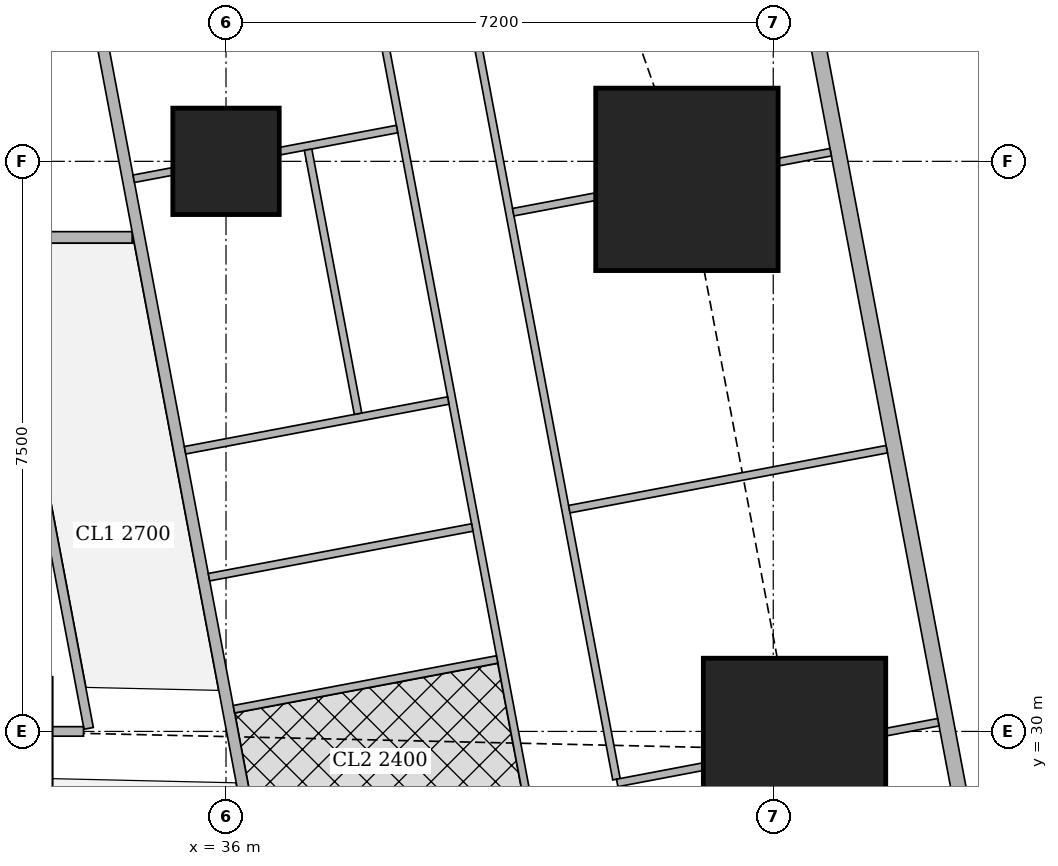
"""IFC4 building model, lengths in metres.
Left out: names, types, materials, properties, quantities, classifications, styles, units other than length and angle.
Written with IfcOpenShell. Run it as: python <this file> out.ifc"""

import sys

from ifc_helpers import new_model, si_unit, direction, frame, frame_2d, origin, origin_2d, place, context, subcontext, project, spatial, rectangle, extrude, element, fill, save


model = new_model("IFC4")
c1 = context("Model", 3, precision=1e-05, world=origin(), true_north=direction((0.0, 1.0)))
c2 = subcontext(c1, "Body", "Model", "MODEL_VIEW")
j1 = project(units=[si_unit("LENGTHUNIT", "METRE"), si_unit("PLANEANGLEUNIT", "RADIAN")], contexts=[c1])
p1 = place(None, origin())
s1 = spatial("IfcSite", under=j1, at=p1, CompositionType="ELEMENT")
p2 = place(p1, origin())
s2 = spatial("IfcBuilding", under=s1, at=p2, CompositionType="ELEMENT")
p3 = place(p2, frame((0.0, 0.0, 223.7)))
s3 = spatial("IfcBuildingStorey", under=s2, at=p3, CompositionType="ELEMENT", Elevation=223.7)
p4 = place(p3, frame((43.48, 29.763, 0.0), z_axis=(0.0, 0.0, 1.0), x_axis=(1.0, 0.0, 0.0)))
e1 = element("IfcColumn", 1, at=p4, inside=s3, PredefinedType="COLUMN", context=c2, shape_type="SweptSolid", body=[
    extrude(rectangle(XDim=2.4, YDim=2.4, at=origin_2d()), origin(), (0.0, 0.0, 1.0), 3.75),
])
p5 = place(p3, frame((36.0, 37.5, 0.0), z_axis=(0.0, 0.0, 1.0), x_axis=(1.0, 0.0, 0.0)))
e2 = element("IfcColumn", 2, at=p5, inside=s3, PredefinedType="COLUMN", context=c2, shape_type="SweptSolid", body=[
    extrude(rectangle(XDim=1.4, YDim=1.4, at=origin_2d()), origin(), (0.0, 0.0, 1.0), 3.75),
])
p6 = place(p3, frame((42.064, 37.263, 0.0), z_axis=(0.0, 0.0, 1.0), x_axis=(1.0, 0.0, 0.0)))
e3 = element("IfcColumn", 3, at=p6, inside=s3, PredefinedType="COLUMN", context=c2, shape_type="SweptSolid", body=[
    extrude(rectangle(XDim=2.4, YDim=2.4, at=origin_2d()), origin(), (0.0, 0.0, 1.0), 3.75),
])
p7 = place(p3, frame((50.653, 2.703, 0.0), z_axis=(0.0, 0.0, 1.0), x_axis=(-0.185612026696, 0.982623109613, 0.0)))
e4 = element("IfcWall", 4, at=p7, inside=s3, PredefinedType="SOLIDWALL", context=c2, shape_type="SweptSolid", body=[
    extrude(rectangle(XDim=41.393, YDim=0.2, at=frame_2d((20.697, 0.0))), origin(), (0.0, 0.0, 1.0), 3.5),
])
p8 = place(p7, frame((1.633, 0.0, 0.9)))
e5 = element("IfcOpeningElement", 5, at=p8, cuts=e4, PredefinedType="OPENING", context=c2, shape_type="SweptSolid", body=[
    extrude(rectangle(XDim=1.8, YDim=1.5, at=frame_2d((0.9, 0.75))), frame((0.0, 0.11, 0.0), z_axis=(0.0, -1.0, 0.0), x_axis=(1.0, 0.0, 0.0)), (0.0, 0.0, 1.0), 0.22),
])
p9 = place(p7, frame((6.032, 0.0, 0.9)))
e6 = element("IfcOpeningElement", 6, at=p9, cuts=e4, PredefinedType="OPENING", context=c2, shape_type="SweptSolid", body=[
    extrude(rectangle(XDim=1.8, YDim=1.5, at=frame_2d((0.9, 0.75))), frame((0.0, 0.11, 0.0), z_axis=(0.0, -1.0, 0.0), x_axis=(1.0, 0.0, 0.0)), (0.0, 0.0, 1.0), 0.22),
])
p10 = place(p7, frame((9.848, 0.0, 0.9)))
e7 = element("IfcOpeningElement", 7, at=p10, cuts=e4, PredefinedType="OPENING", context=c2, shape_type="SweptSolid", body=[
    extrude(rectangle(XDim=1.8, YDim=1.5, at=frame_2d((0.9, 0.75))), frame((0.0, 0.11, 0.0), z_axis=(0.0, -1.0, 0.0), x_axis=(1.0, 0.0, 0.0)), (0.0, 0.0, 1.0), 0.22),
])
p11 = place(p7, frame((13.664, 0.0, 0.9)))
e8 = element("IfcOpeningElement", 8, at=p11, cuts=e4, PredefinedType="OPENING", context=c2, shape_type="SweptSolid", body=[
    extrude(rectangle(XDim=1.8, YDim=1.5, at=frame_2d((0.9, 0.75))), frame((0.0, 0.11, 0.0), z_axis=(0.0, -1.0, 0.0), x_axis=(1.0, 0.0, 0.0)), (0.0, 0.0, 1.0), 0.22),
])
p12 = place(p7, frame((17.481, 0.0, 0.9)))
e9 = element("IfcOpeningElement", 9, at=p12, cuts=e4, PredefinedType="OPENING", context=c2, shape_type="SweptSolid", body=[
    extrude(rectangle(XDim=1.8, YDim=1.5, at=frame_2d((0.9, 0.75))), frame((0.0, 0.11, 0.0), z_axis=(0.0, -1.0, 0.0), x_axis=(1.0, 0.0, 0.0)), (0.0, 0.0, 1.0), 0.22),
])
p13 = place(p7, frame((21.297, 0.0, 0.9)))
e10 = element("IfcOpeningElement", 10, at=p13, cuts=e4, PredefinedType="OPENING", context=c2, shape_type="SweptSolid", body=[
    extrude(rectangle(XDim=1.8, YDim=1.5, at=frame_2d((0.9, 0.75))), frame((0.0, 0.11, 0.0), z_axis=(0.0, -1.0, 0.0), x_axis=(1.0, 0.0, 0.0)), (0.0, 0.0, 1.0), 0.22),
])
p14 = place(p7, frame((25.113, 0.0, 0.9)))
e11 = element("IfcOpeningElement", 11, at=p14, cuts=e4, PredefinedType="OPENING", context=c2, shape_type="SweptSolid", body=[
    extrude(rectangle(XDim=1.8, YDim=1.5, at=frame_2d((0.9, 0.75))), frame((0.0, 0.11, 0.0), z_axis=(0.0, -1.0, 0.0), x_axis=(1.0, 0.0, 0.0)), (0.0, 0.0, 1.0), 0.22),
])
p15 = place(p7, frame((28.93, 0.0, 0.9)))
e12 = element("IfcOpeningElement", 12, at=p15, cuts=e4, PredefinedType="OPENING", context=c2, shape_type="SweptSolid", body=[
    extrude(rectangle(XDim=1.8, YDim=1.5, at=frame_2d((0.9, 0.75))), frame((0.0, 0.11, 0.0), z_axis=(0.0, -1.0, 0.0), x_axis=(1.0, 0.0, 0.0)), (0.0, 0.0, 1.0), 0.22),
])
p16 = place(p7, frame((32.746, 0.0, 0.9)))
e13 = element("IfcOpeningElement", 13, at=p16, cuts=e4, PredefinedType="OPENING", context=c2, shape_type="SweptSolid", body=[
    extrude(rectangle(XDim=1.8, YDim=1.5, at=frame_2d((0.9, 0.75))), frame((0.0, 0.11, 0.0), z_axis=(0.0, -1.0, 0.0), x_axis=(1.0, 0.0, 0.0)), (0.0, 0.0, 1.0), 0.22),
])
p17 = place(p7, frame((36.481, 0.0, 0.9)))
e14 = element("IfcOpeningElement", 14, at=p17, cuts=e4, PredefinedType="OPENING", context=c2, shape_type="SweptSolid", body=[
    extrude(rectangle(XDim=1.8, YDim=1.5, at=frame_2d((0.9, 0.75))), frame((0.0, 0.11, 0.0), z_axis=(0.0, -1.0, 0.0), x_axis=(1.0, 0.0, 0.0)), (0.0, 0.0, 1.0), 0.22),
])
p18 = place(p3, frame((16.201, 36.5, 0.0), z_axis=(0.0, 0.0, 1.0), x_axis=(1.0, 0.0, 0.0)))
e15 = element("IfcWall", 15, at=p18, inside=s3, PredefinedType="SOLIDWALL", context=c2, shape_type="SweptSolid", body=[
    extrude(rectangle(XDim=18.564, YDim=0.15, at=frame_2d((9.282, 0.0))), origin(), (0.0, 0.0, 1.0), 3.5),
])
p19 = place(p18, frame((0.874, 0.0, 0.0)))
e16 = element("IfcOpeningElement", 16, at=p19, cuts=e15, PredefinedType="OPENING", context=c2, shape_type="SweptSolid", body=[
    extrude(rectangle(XDim=1.0, YDim=2.1, at=frame_2d((0.5, 1.05))), frame((0.0, 0.085, 0.0), z_axis=(0.0, -1.0, 0.0), x_axis=(1.0, 0.0, 0.0)), (0.0, 0.0, 1.0), 0.17),
])
p20 = place(p18, frame((10.156, 0.0, 0.0)))
e17 = element("IfcOpeningElement", 17, at=p20, cuts=e15, PredefinedType="OPENING", context=c2, shape_type="SweptSolid", body=[
    extrude(rectangle(XDim=1.0, YDim=2.1, at=frame_2d((0.5, 1.05))), frame((0.0, 0.085, 0.0), z_axis=(0.0, -1.0, 0.0), x_axis=(1.0, 0.0, 0.0)), (0.0, 0.0, 1.0), 0.17),
])
p21 = place(p3, frame((33.68, 42.723, 0.0), z_axis=(0.0, 0.0, 1.0), x_axis=(0.185601160014, -0.982625162207, 0.0)))
e18 = element("IfcWall", 18, at=p21, inside=s3, PredefinedType="SOLIDWALL", context=c2, shape_type="SweptSolid", body=[
    extrude(rectangle(XDim=41.051, YDim=0.15, at=frame_2d((20.526, 0.0))), origin(), (0.0, 0.0, 1.0), 2.5),
])
p22 = place(p21, frame((16.123, 0.0, 0.0)))
e19 = element("IfcOpeningElement", 19, at=p22, cuts=e18, PredefinedType="OPENING", context=c2, shape_type="SweptSolid", body=[
    extrude(rectangle(XDim=1.0, YDim=2.1, at=frame_2d((0.5, 1.05))), frame((0.0, 0.085, 0.0), z_axis=(0.0, -1.0, 0.0), x_axis=(1.0, 0.0, 0.0)), (0.0, 0.0, 1.0), 0.17),
])
p23 = place(p21, frame((19.938, 0.0, 0.0)))
e20 = element("IfcOpeningElement", 20, at=p23, cuts=e18, PredefinedType="OPENING", context=c2, shape_type="SweptSolid", body=[
    extrude(rectangle(XDim=1.0, YDim=2.1, at=frame_2d((0.5, 1.05))), frame((0.0, 0.085, 0.0), z_axis=(0.0, -1.0, 0.0), x_axis=(1.0, 0.0, 0.0)), (0.0, 0.0, 1.0), 0.17),
])
p24 = place(p21, frame((30.902, 0.0, 0.0)))
e21 = element("IfcOpeningElement", 21, at=p24, cuts=e18, PredefinedType="OPENING", context=c2, shape_type="SweptSolid", body=[
    extrude(rectangle(XDim=1.0, YDim=2.1, at=frame_2d((0.5, 1.05))), frame((0.0, 0.085, 0.0), z_axis=(0.0, -1.0, 0.0), x_axis=(1.0, 0.0, 0.0)), (0.0, 0.0, 1.0), 0.17),
])
p25 = place(p3, frame((38.764, 41.941, 0.0), z_axis=(0.0, 0.0, 1.0), x_axis=(0.185512176227, -0.982641965556, 0.0)))
e22 = element("IfcWall", 22, at=p25, inside=s3, PredefinedType="PARTITIONING", context=c2, shape_type="SweptSolid", body=[
    extrude(rectangle(XDim=12.792, YDim=0.1, at=frame_2d((6.396, 0.0))), origin(), (0.0, 0.0, 1.0), 2.5),
])
p26 = place(p25, frame((11.35, 0.0, 0.0)))
e23 = element("IfcOpeningElement", 23, at=p26, cuts=e22, PredefinedType="OPENING", context=c2, shape_type="SweptSolid", body=[
    extrude(rectangle(XDim=0.9, YDim=2.1, at=frame_2d((0.45, 1.05))), frame((0.0, 0.06, 0.0), z_axis=(0.0, -1.0, 0.0), x_axis=(1.0, 0.0, 0.0)), (0.0, 0.0, 1.0), 0.12),
])
p27 = place(p25, frame((8.085, 0.0, 0.0)))
e24 = element("IfcOpeningElement", 24, at=p27, cuts=e22, PredefinedType="OPENING", context=c2, shape_type="SweptSolid", body=[
    extrude(rectangle(XDim=0.9, YDim=2.1, at=frame_2d((0.45, 1.05))), frame((0.0, 0.06, 0.0), z_axis=(0.0, -1.0, 0.0), x_axis=(1.0, 0.0, 0.0)), (0.0, 0.0, 1.0), 0.12),
])
p28 = place(p25, frame((3.7, 0.0, 0.0)))
e25 = element("IfcOpeningElement", 25, at=p28, cuts=e22, PredefinedType="OPENING", context=c2, shape_type="SweptSolid", body=[
    extrude(rectangle(XDim=0.9, YDim=2.1, at=frame_2d((0.45, 1.05))), frame((0.0, 0.06, 0.0), z_axis=(0.0, -1.0, 0.0), x_axis=(1.0, 0.0, 0.0)), (0.0, 0.0, 1.0), 0.12),
])
p29 = place(p3, frame((37.473, 42.309, 0.0), z_axis=(0.0, 0.0, 1.0), x_axis=(0.185570636839, -0.982630927024, 0.0)))
e26 = element("IfcWall", 26, at=p29, inside=s3, PredefinedType="PARTITIONING", context=c2, shape_type="SweptSolid", body=[
    extrude(rectangle(XDim=13.553, YDim=0.1, at=frame_2d((6.777, 0.0))), origin(), (0.0, 0.0, 1.0), 2.5),
])
p30 = place(p29, frame((12.128, 0.0, 0.0)))
e27 = element("IfcOpeningElement", 27, at=p30, cuts=e26, PredefinedType="OPENING", context=c2, shape_type="SweptSolid", body=[
    extrude(rectangle(XDim=0.9, YDim=2.1, at=frame_2d((0.45, 1.05))), frame((0.0, 0.06, 0.0), z_axis=(0.0, -1.0, 0.0), x_axis=(1.0, 0.0, 0.0)), (0.0, 0.0, 1.0), 0.12),
])
p31 = place(p29, frame((8.487, 0.0, 0.0)))
e28 = element("IfcOpeningElement", 28, at=p31, cuts=e26, PredefinedType="OPENING", context=c2, shape_type="SweptSolid", body=[
    extrude(rectangle(XDim=0.9, YDim=2.1, at=frame_2d((0.45, 1.05))), frame((0.0, 0.06, 0.0), z_axis=(0.0, -1.0, 0.0), x_axis=(1.0, 0.0, 0.0)), (0.0, 0.0, 1.0), 0.12),
])
p32 = place(p29, frame((2.853, 0.0, 0.0)))
e29 = element("IfcOpeningElement", 29, at=p32, cuts=e26, PredefinedType="OPENING", context=c2, shape_type="SweptSolid", body=[
    extrude(rectangle(XDim=0.9, YDim=2.1, at=frame_2d((0.45, 1.05))), frame((0.0, 0.06, 0.0), z_axis=(0.0, -1.0, 0.0), x_axis=(1.0, 0.0, 0.0)), (0.0, 0.0, 1.0), 0.12),
])
p33 = place(p29, frame((10.22, 0.0, 0.0)))
e30 = element("IfcOpeningElement", 30, at=p33, cuts=e26, PredefinedType="OPENING", context=c2, shape_type="SweptSolid", body=[
    extrude(rectangle(XDim=0.9, YDim=2.1, at=frame_2d((0.45, 1.05))), frame((0.0, 0.06, 0.0), z_axis=(0.0, -1.0, 0.0), x_axis=(1.0, 0.0, 0.0)), (0.0, 0.0, 1.0), 0.12),
])
p34 = place(p29, frame((5.819, 0.0, 0.0)))
e31 = element("IfcOpeningElement", 31, at=p34, cuts=e26, PredefinedType="OPENING", context=c2, shape_type="SweptSolid", body=[
    extrude(rectangle(XDim=0.9, YDim=2.1, at=frame_2d((0.45, 1.05))), frame((0.0, 0.06, 0.0), z_axis=(0.0, -1.0, 0.0), x_axis=(1.0, 0.0, 0.0)), (0.0, 0.0, 1.0), 0.12),
])
p35 = place(p3, frame((43.955, 37.62, 0.0), z_axis=(0.0, 0.0, 1.0), x_axis=(-0.982495415327, -0.186286765128, 0.0)))
e32 = element("IfcWall", 32, at=p35, inside=s3, PredefinedType="PARTITIONING", context=c2, shape_type="SweptSolid", body=[
    extrude(rectangle(XDim=0.693, YDim=0.1, at=frame_2d((0.347, 0.0))), origin(), (0.0, 0.0, 1.0), 3.5),
])
p36 = place(p3, frame((40.854, 37.034, 0.0), z_axis=(0.0, 0.0, 1.0), x_axis=(-0.982651678759, -0.185460718839, 0.0)))
e33 = element("IfcWall", 33, at=p36, inside=s3, PredefinedType="PARTITIONING", context=c2, shape_type="SweptSolid", body=[
    extrude(rectangle(XDim=1.094, YDim=0.1, at=frame_2d((0.547, 0.0))), origin(), (0.0, 0.0, 1.0), 3.5),
])
p37 = place(p3, frame((44.693, 33.713, 0.0), z_axis=(0.0, 0.0, 1.0), x_axis=(-0.982623519589, -0.185609856287, 0.0)))
e34 = element("IfcWall", 34, at=p37, inside=s3, PredefinedType="PARTITIONING", context=c2, shape_type="SweptSolid", body=[
    extrude(rectangle(XDim=4.25, YDim=0.1, at=frame_2d((2.125, 0.0))), origin(), (0.0, 0.0, 1.0), 2.05),
])
p38 = place(p3, frame((45.372, 30.121, 0.0), z_axis=(0.0, 0.0, 1.0), x_axis=(-0.98254419619, -0.186029305578, 0.0)))
e35 = element("IfcWall", 35, at=p38, inside=s3, PredefinedType="PARTITIONING", context=c2, shape_type="SweptSolid", body=[
    extrude(rectangle(XDim=0.694, YDim=0.1, at=frame_2d((0.347, 0.0))), origin(), (0.0, 0.0, 1.0), 3.5),
])
p39 = place(p3, frame((42.27, 29.535, 0.0), z_axis=(0.0, 0.0, 1.0), x_axis=(-0.982502700549, -0.186248338017, 0.0)))
e36 = element("IfcWall", 36, at=p39, inside=s3, PredefinedType="PARTITIONING", context=c2, shape_type="SweptSolid", body=[
    extrude(rectangle(XDim=1.143, YDim=0.1, at=frame_2d((0.572, 0.0))), origin(), (0.0, 0.0, 1.0), 2.5),
])
p40 = place(p3, frame((38.25, 37.925, 0.0), z_axis=(0.0, 0.0, 1.0), x_axis=(-0.982610209589, -0.185680305934, 0.0)))
e37 = element("IfcWall", 37, at=p40, inside=s3, PredefinedType="PARTITIONING", context=c2, shape_type="SweptSolid", body=[
    extrude(rectangle(XDim=1.567, YDim=0.1, at=frame_2d((0.784, 0.0))), origin(), (0.0, 0.0, 1.0), 3.5),
])
p41 = place(p3, frame((35.29, 37.366, 0.0), z_axis=(0.0, 0.0, 1.0), x_axis=(-0.982715597703, -0.185121727606, 0.0)))
e38 = element("IfcWall", 38, at=p41, inside=s3, PredefinedType="PARTITIONING", context=c2, shape_type="SweptSolid", body=[
    extrude(rectangle(XDim=0.513, YDim=0.1, at=frame_2d((0.256, 0.0))), origin(), (0.0, 0.0, 1.0), 3.5),
])
p42 = place(p3, frame((39.24, 32.683, 0.0), z_axis=(0.0, 0.0, 1.0), x_axis=(-0.982638553676, -0.185530247748, 0.0)))
e39 = element("IfcWall", 39, at=p42, inside=s3, PredefinedType="PARTITIONING", context=c2, shape_type="SweptSolid", body=[
    extrude(rectangle(XDim=3.525, YDim=0.1, at=frame_2d((1.763, 0.0))), origin(), (0.0, 0.0, 1.0), 3.5),
])
p43 = place(p3, frame((39.567, 30.947, 0.0), z_axis=(0.0, 0.0, 1.0), x_axis=(-0.982576058723, -0.185860939478, 0.0)))
e40 = element("IfcWall", 40, at=p43, inside=s3, PredefinedType="PARTITIONING", context=c2, shape_type="SweptSolid", body=[
    extrude(rectangle(XDim=3.524, YDim=0.1, at=frame_2d((1.762, 0.0))), origin(), (0.0, 0.0, 1.0), 2.5),
])
p44 = place(p3, frame((38.924, 34.353, 0.0), z_axis=(0.0, 0.0, 1.0), x_axis=(-0.982629014545, -0.18558076348, 0.0)))
e41 = element("IfcWall", 41, at=p44, inside=s3, PredefinedType="PARTITIONING", context=c2, shape_type="SweptSolid", body=[
    extrude(rectangle(XDim=3.524, YDim=0.1, at=frame_2d((1.762, 0.0))), origin(), (0.0, 0.0, 1.0), 3.5),
])
p45 = place(p3, frame((37.08, 37.653, 0.0), z_axis=(0.0, 0.0, 1.0), x_axis=(0.185864634688, -0.982575359742, 0.0)))
e42 = element("IfcWall", 42, at=p45, inside=s3, PredefinedType="PARTITIONING", context=c2, shape_type="SweptSolid", body=[
    extrude(rectangle(XDim=3.535, YDim=0.1, at=frame_2d((1.767, 0.0))), origin(), (0.0, 0.0, 1.0), 3.5),
])
p46 = place(p45, frame((1.317, 0.0, 0.0)))
e43 = element("IfcOpeningElement", 43, at=p46, cuts=e42, PredefinedType="OPENING", context=c2, shape_type="SweptSolid", body=[
    extrude(rectangle(XDim=0.9, YDim=2.1, at=frame_2d((0.45, 1.05))), frame((0.0, 0.06, 0.0), z_axis=(0.0, -1.0, 0.0), x_axis=(1.0, 0.0, 0.0)), (0.0, 0.0, 1.0), 0.12),
])
p47 = place(p3, frame((34.193, 30.04, 0.0), z_axis=(0.0, 0.0, 1.0), x_axis=(-0.185626015863, 0.982620467034, 0.0)))
e44 = element("IfcWall", 44, at=p47, inside=s3, PredefinedType="PARTITIONING", context=c2, shape_type="SweptSolid", body=[
    extrude(rectangle(XDim=4.628, YDim=0.125, at=frame_2d((2.314, 0.0))), origin(), (0.0, 0.0, 1.0), 2.5),
])
p48 = place(p47, frame((0.95, 0.0, 0.0)))
e45 = element("IfcOpeningElement", 45, at=p48, cuts=e44, PredefinedType="OPENING", context=c2, shape_type="SweptSolid", body=[
    extrude(rectangle(XDim=1.0, YDim=2.1, at=frame_2d((0.5, 1.05))), frame((0.0, 0.073, 0.0), z_axis=(0.0, -1.0, 0.0), x_axis=(1.0, 0.0, 0.0)), (0.0, 0.0, 1.0), 0.145),
])
p49 = place(p47, frame((3.225, 0.0, 0.0)))
e46 = element("IfcOpeningElement", 46, at=p49, cuts=e44, PredefinedType="OPENING", context=c2, shape_type="SweptSolid", body=[
    extrude(rectangle(XDim=1.0, YDim=2.1, at=frame_2d((0.5, 1.05))), frame((0.0, 0.073, 0.0), z_axis=(0.0, -1.0, 0.0), x_axis=(1.0, 0.0, 0.0)), (0.0, 0.0, 1.0), 0.145),
])
p50 = place(p3, frame((35.576, 15.713, 0.0), z_axis=(0.0, 0.0, 1.0), x_axis=(-0.185602982696, 0.982624817931, 0.0)))
e47 = element("IfcWall", 47, at=p50, inside=s3, PredefinedType="PARTITIONING", context=c2, shape_type="SweptSolid", body=[
    extrude(rectangle(XDim=13.814, YDim=0.125, at=frame_2d((6.907, 0.0))), origin(), (0.0, 0.0, 1.0), 2.5),
])
p51 = place(p50, frame((5.3, 0.0, 0.0)))
e48 = element("IfcOpeningElement", 48, at=p51, cuts=e47, PredefinedType="OPENING", context=c2, shape_type="SweptSolid", body=[
    extrude(rectangle(XDim=1.0, YDim=2.1, at=frame_2d((0.5, 1.05))), frame((0.0, 0.073, 0.0), z_axis=(0.0, -1.0, 0.0), x_axis=(1.0, 0.0, 0.0)), (0.0, 0.0, 1.0), 0.145),
])
p52 = place(p3, frame((33.701, 30.0, 0.0), z_axis=(0.0, 0.0, 1.0), x_axis=(1.0, 0.0, 0.0)))
e49 = element("IfcWall", 49, at=p52, inside=s3, PredefinedType="PARTITIONING", context=c2, shape_type="SweptSolid", body=[
    extrude(rectangle(XDim=0.424, YDim=0.125, at=frame_2d((0.212, 0.0))), origin(), (0.0, 0.0, 1.0), 2.5),
])
p53 = place(p15, origin())
e50 = element("IfcWindow", 50, at=p53, inside=s3, PartitioningType="SINGLE_PANEL", PredefinedType="WINDOW", context=c2, shape_type="SweptSolid", body=[
    extrude(rectangle(XDim=1.8, YDim=1.5, at=frame_2d((0.9, 0.75))), frame((0.0, 0.03, 0.0), z_axis=(0.0, -1.0, 0.0), x_axis=(1.0, 0.0, 0.0)), (0.0, 0.0, 1.0), 0.06),
])
fill(e12, e50)
p54 = place(p16, origin())
e51 = element("IfcWindow", 51, at=p54, inside=s3, PartitioningType="SINGLE_PANEL", PredefinedType="WINDOW", context=c2, shape_type="SweptSolid", body=[
    extrude(rectangle(XDim=1.8, YDim=1.5, at=frame_2d((0.9, 0.75))), frame((0.0, 0.03, 0.0), z_axis=(0.0, -1.0, 0.0), x_axis=(1.0, 0.0, 0.0)), (0.0, 0.0, 1.0), 0.06),
])
fill(e13, e51)
p55 = place(p17, origin())
e52 = element("IfcWindow", 52, at=p55, inside=s3, PartitioningType="SINGLE_PANEL", PredefinedType="WINDOW", context=c2, shape_type="SweptSolid", body=[
    extrude(rectangle(XDim=1.8, YDim=1.5, at=frame_2d((0.9, 0.75))), frame((0.0, 0.03, 0.0), z_axis=(0.0, -1.0, 0.0), x_axis=(1.0, 0.0, 0.0)), (0.0, 0.0, 1.0), 0.06),
])
fill(e14, e52)
p56 = place(p26, origin())
e53 = element("IfcDoor", 53, at=p56, inside=s3, OperationType="SINGLE_SWING_RIGHT", PredefinedType="DOOR", context=c2, shape_type="SweptSolid", body=[
    extrude(rectangle(XDim=0.9, YDim=2.1, at=frame_2d((0.45, 1.05))), frame((0.0, 0.025, 0.0), z_axis=(0.0, -1.0, 0.0), x_axis=(1.0, 0.0, 0.0)), (0.0, 0.0, 1.0), 0.05),
])
fill(e23, e53)
p57 = place(p27, origin())
e54 = element("IfcDoor", 54, at=p57, inside=s3, OperationType="SINGLE_SWING_RIGHT", PredefinedType="DOOR", context=c2, shape_type="SweptSolid", body=[
    extrude(rectangle(XDim=0.9, YDim=2.1, at=frame_2d((0.45, 1.05))), frame((0.0, 0.025, 0.0), z_axis=(0.0, -1.0, 0.0), x_axis=(1.0, 0.0, 0.0)), (0.0, 0.0, 1.0), 0.05),
])
fill(e24, e54)
p58 = place(p28, origin())
e55 = element("IfcDoor", 55, at=p58, inside=s3, OperationType="SINGLE_SWING_RIGHT", PredefinedType="DOOR", context=c2, shape_type="SweptSolid", body=[
    extrude(rectangle(XDim=0.9, YDim=2.1, at=frame_2d((0.45, 1.05))), frame((0.0, 0.025, 0.0), z_axis=(0.0, -1.0, 0.0), x_axis=(1.0, 0.0, 0.0)), (0.0, 0.0, 1.0), 0.05),
])
fill(e25, e55)
p59 = place(p30, origin())
e56 = element("IfcDoor", 56, at=p59, inside=s3, OperationType="SINGLE_SWING_LEFT", PredefinedType="DOOR", context=c2, shape_type="SweptSolid", body=[
    extrude(rectangle(XDim=0.9, YDim=2.1, at=frame_2d((0.45, 1.05))), frame((0.0, 0.025, 0.0), z_axis=(0.0, -1.0, 0.0), x_axis=(1.0, 0.0, 0.0)), (0.0, 0.0, 1.0), 0.05),
])
fill(e27, e56)
p60 = place(p31, origin())
e57 = element("IfcDoor", 57, at=p60, inside=s3, OperationType="SINGLE_SWING_LEFT", PredefinedType="DOOR", context=c2, shape_type="SweptSolid", body=[
    extrude(rectangle(XDim=0.9, YDim=2.1, at=frame_2d((0.45, 1.05))), frame((0.0, 0.025, 0.0), z_axis=(0.0, -1.0, 0.0), x_axis=(1.0, 0.0, 0.0)), (0.0, 0.0, 1.0), 0.05),
])
fill(e28, e57)
p61 = place(p32, origin())
e58 = element("IfcDoor", 58, at=p61, inside=s3, OperationType="SINGLE_SWING_LEFT", PredefinedType="DOOR", context=c2, shape_type="SweptSolid", body=[
    extrude(rectangle(XDim=0.9, YDim=2.1, at=frame_2d((0.45, 1.05))), frame((0.0, 0.025, 0.0), z_axis=(0.0, -1.0, 0.0), x_axis=(1.0, 0.0, 0.0)), (0.0, 0.0, 1.0), 0.05),
])
fill(e29, e58)
p62 = place(p33, origin())
e59 = element("IfcDoor", 59, at=p62, inside=s3, OperationType="SINGLE_SWING_RIGHT", PredefinedType="DOOR", context=c2, shape_type="SweptSolid", body=[
    extrude(rectangle(XDim=0.9, YDim=2.1, at=frame_2d((0.45, 1.05))), frame((0.0, 0.025, 0.0), z_axis=(0.0, -1.0, 0.0), x_axis=(1.0, 0.0, 0.0)), (0.0, 0.0, 1.0), 0.05),
])
fill(e30, e59)
p63 = place(p34, origin())
e60 = element("IfcDoor", 60, at=p63, inside=s3, OperationType="SINGLE_SWING_RIGHT", PredefinedType="DOOR", context=c2, shape_type="SweptSolid", body=[
    extrude(rectangle(XDim=0.9, YDim=2.1, at=frame_2d((0.45, 1.05))), frame((0.0, 0.025, 0.0), z_axis=(0.0, -1.0, 0.0), x_axis=(1.0, 0.0, 0.0)), (0.0, 0.0, 1.0), 0.05),
])
fill(e31, e60)
p64 = place(p46, origin())
e61 = element("IfcDoor", 61, at=p64, inside=s3, OperationType="SINGLE_SWING_LEFT", PredefinedType="DOOR", context=c2, shape_type="SweptSolid", body=[
    extrude(rectangle(XDim=0.9, YDim=2.1, at=frame_2d((0.45, 1.05))), frame((0.0, 0.025, 0.0), z_axis=(0.0, -1.0, 0.0), x_axis=(1.0, 0.0, 0.0)), (0.0, 0.0, 1.0), 0.05),
])
fill(e43, e61)
p65 = place(p48, origin())
e62 = element("IfcDoor", 62, at=p65, inside=s3, OperationType="SINGLE_SWING_RIGHT", PredefinedType="DOOR", context=c2, shape_type="SweptSolid", body=[
    extrude(rectangle(XDim=1.0, YDim=2.1, at=frame_2d((0.5, 1.05))), frame((0.0, 0.025, 0.0), z_axis=(0.0, -1.0, 0.0), x_axis=(1.0, 0.0, 0.0)), (0.0, 0.0, 1.0), 0.05),
])
fill(e45, e62)
save(model, sys.argv[1])
